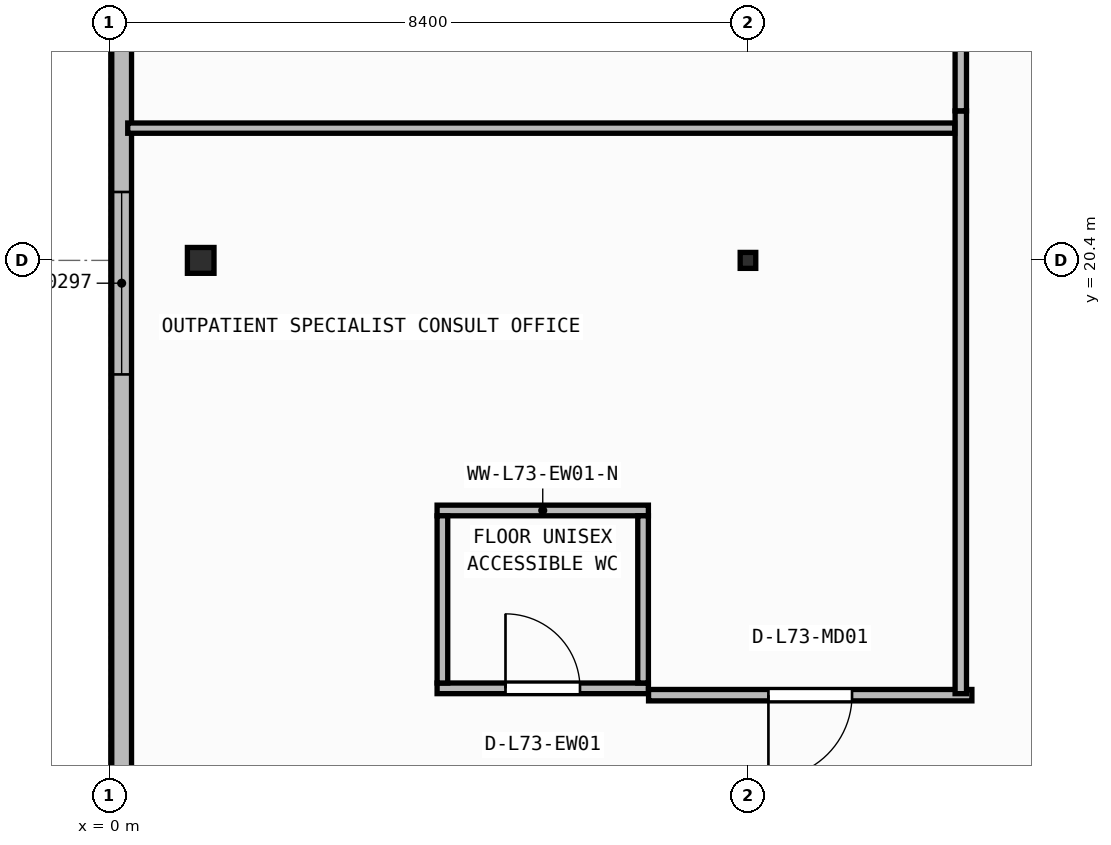
"""IFC4 building model, lengths in metres.
Left out: names, types, materials, properties, quantities, classifications, styles, units other than length and angle.
Written with IfcOpenShell. Run it as: python <this file> out.ifc"""

import sys

from ifc_helpers import new_model, si_unit, direction, frame, frame_2d, origin, origin_2d, place, context, subcontext, project, spatial, rectangle, i_section, extrude, element, fill, save


model = new_model("IFC4")
c1 = context("Model", 3, precision=1e-05, world=origin(), true_north=direction((0.0, 1.0)))
c2 = subcontext(c1, "Body", "Model", "MODEL_VIEW")
j1 = project(units=[si_unit("LENGTHUNIT", "METRE"), si_unit("PLANEANGLEUNIT", "RADIAN")], contexts=[c1])
p1 = place(None, origin())
s1 = spatial("IfcSite", under=j1, at=p1, CompositionType="ELEMENT")
p2 = place(p1, origin())
s2 = spatial("IfcBuilding", under=s1, at=p2, CompositionType="ELEMENT")
p3 = place(p2, frame((0.0, 0.0, 296.05)))
s3 = spatial("IfcBuildingStorey", under=s2, at=p3, CompositionType="ELEMENT", Elevation=296.05)
p4 = place(p3, frame((1.2, 20.4, 0.0), z_axis=(0.0, 0.0, 1.0), x_axis=(1.0, 0.0, 0.0)))
e1 = element("IfcColumn", 1, at=p4, inside=s3, PredefinedType="COLUMN", context=c2, shape_type="SweptSolid", body=[
    extrude(i_section(OverallWidth=0.35, OverallDepth=0.34, WebThickness=0.016, FlangeThickness=0.028, at=origin_2d()), origin(), (0.0, 0.0, 1.0), 3.95),
])
p5 = place(p3, frame((8.4, 20.4, 0.0), z_axis=(0.0, 0.0, 1.0), x_axis=(1.0, 0.0, 0.0)))
e2 = element("IfcColumn", 2, at=p5, inside=s3, PredefinedType="COLUMN", context=c2, shape_type="SweptSolid", body=[
    extrude(i_section(OverallWidth=0.205, OverallDepth=0.21, WebThickness=0.009, FlangeThickness=0.014, FilletRadius=0.011, at=origin_2d()), origin(), (0.0, 0.0, 1.0), 3.95),
])
p6 = place(p3, frame((0.16, 37.74, 0.0), z_axis=(0.0, 0.0, 1.0), x_axis=(0.0, -1.0, 0.0)))
e3 = element("IfcWall", 3, at=p6, inside=s3, PredefinedType="STANDARD", context=c2, shape_type="SweptSolid", body=[
    extrude(rectangle(XDim=35.28, YDim=0.26, at=frame_2d((17.64, 0.0))), origin(), (0.0, 0.0, 1.0), 3.71),
])
p7 = place(p6, frame((16.44, 0.0, 0.9)))
e4 = element("IfcOpeningElement", 4, at=p7, cuts=e3, PredefinedType="OPENING", context=c2, shape_type="SweptSolid", body=[
    extrude(rectangle(XDim=2.4, YDim=1.65, at=frame_2d((1.2, 0.825))), frame((0.0, 0.14, 0.0), z_axis=(0.0, -1.0, 0.0), x_axis=(1.0, 0.0, 0.0)), (0.0, 0.0, 1.0), 0.28),
])
p8 = place(p3, frame((4.31, 14.77, 0.0), z_axis=(0.0, 0.0, 1.0), x_axis=(1.0, 0.0, 0.0)))
e5 = element("IfcWall", 5, at=p8, inside=s3, PredefinedType="PARTITIONING", context=c2, shape_type="SweptSolid", body=[
    extrude(rectangle(XDim=2.78, YDim=0.14, at=frame_2d((1.39, 0.0))), origin(), (0.0, 0.0, 1.0), 3.71),
])
p9 = place(p8, frame((0.9, 0.0, 0.0)))
e6 = element("IfcOpeningElement", 6, at=p9, cuts=e5, PredefinedType="OPENING", context=c2, shape_type="SweptSolid", body=[
    extrude(rectangle(XDim=0.98, YDim=2.1, at=frame_2d((0.49, 1.05))), frame((0.0, 0.08, 0.0), z_axis=(0.0, -1.0, 0.0), x_axis=(1.0, 0.0, 0.0)), (0.0, 0.0, 1.0), 0.16),
])
p10 = place(p3, frame((4.31, 17.11, 0.0), z_axis=(0.0, 0.0, 1.0), x_axis=(1.0, 0.0, 0.0)))
e7 = element("IfcWall", 7, at=p10, inside=s3, PredefinedType="PARTITIONING", context=c2, shape_type="SweptSolid", body=[
    extrude(rectangle(XDim=2.78, YDim=0.14, at=frame_2d((1.39, 0.0))), origin(), (0.0, 0.0, 1.0), 3.71),
])
for number, where, z_axis, x_axis in (
    (8, (4.38, 14.84, 0.0), (0.0, 0.0, 1.0), (0.0, 1.0, 0.0)),
    (9, (7.02, 14.84, 0.0), (0.0, 0.0, 1.0), (0.0, 1.0, 0.0)),
):
    element("IfcWall", number, at=place(p3, frame(where, z_axis=z_axis, x_axis=x_axis)), inside=s3, PredefinedType="PARTITIONING", context=c2, shape_type="SweptSolid", body=[
        extrude(rectangle(XDim=2.2, YDim=0.14, at=frame_2d((1.1, 0.0))), origin(), (0.0, 0.0, 1.0), 3.71),
    ])
p11 = place(p3, frame((11.346, 14.68, 0.0), z_axis=(0.0, 0.0, 1.0), x_axis=(-1.0, 0.0, 0.0)))
e10 = element("IfcWall", 10, at=p11, inside=s3, PredefinedType="PARTITIONING", context=c2, shape_type="SweptSolid", body=[
    extrude(rectangle(XDim=4.254, YDim=0.15, at=frame_2d((2.127, 0.0))), origin(), (0.0, 0.0, 1.0), 3.71),
])
p12 = place(p11, frame((1.577, 0.0, 0.0)))
e11 = element("IfcOpeningElement", 11, at=p12, cuts=e10, PredefinedType="OPENING", context=c2, shape_type="SweptSolid", body=[
    extrude(rectangle(XDim=1.1, YDim=2.1, at=frame_2d((0.55, 1.05))), frame((0.0, 0.085, 0.0), z_axis=(0.0, -1.0, 0.0), x_axis=(1.0, 0.0, 0.0)), (0.0, 0.0, 1.0), 0.17),
])
p13 = place(p3, frame((11.2, 22.366, 0.0), z_axis=(0.0, 0.0, 1.0), x_axis=(0.0, -1.0, 0.0)))
e12 = element("IfcWall", 12, at=p13, inside=s3, PredefinedType="PARTITIONING", context=c2, shape_type="SweptSolid", body=[
    extrude(rectangle(XDim=7.666, YDim=0.15, at=frame_2d((3.833, 0.0))), origin(), (0.0, 0.0, 1.0), 3.71),
])
p14 = place(p3, frame((11.2, 29.6, 0.0), z_axis=(0.0, 0.0, 1.0), x_axis=(0.0, -1.0, 0.0)))
e13 = element("IfcWall", 13, at=p14, inside=s3, PredefinedType="PARTITIONING", context=c2, shape_type="SweptSolid", body=[
    extrude(rectangle(XDim=7.232, YDim=0.15, at=frame_2d((3.616, 0.0))), origin(), (0.0, 0.0, 1.0), 3.71),
])
p15 = place(p14, frame((3.066, 0.0, 0.0)))
e14 = element("IfcOpeningElement", 14, at=p15, cuts=e13, PredefinedType="OPENING", context=c2, shape_type="SweptSolid", body=[
    extrude(rectangle(XDim=1.1, YDim=2.1, at=frame_2d((0.55, 1.05))), frame((0.0, 0.085, 0.0), z_axis=(0.0, -1.0, 0.0), x_axis=(1.0, 0.0, 0.0)), (0.0, 0.0, 1.0), 0.17),
])
p16 = place(p3, frame((11.12, 22.14, 0.0), z_axis=(0.0, 0.0, 1.0), x_axis=(-1.0, 0.0, 0.0)))
e15 = element("IfcWall", 15, at=p16, inside=s3, PredefinedType="PARTITIONING", context=c2, shape_type="SweptSolid", body=[
    extrude(rectangle(XDim=10.88, YDim=0.135, at=frame_2d((5.44, 0.0))), origin(), (0.0, 0.0, 1.0), 3.71),
])
p17 = place(p7, origin())
e16 = element("IfcWindow", 16, at=p17, inside=s3, PartitioningType="SINGLE_PANEL", PredefinedType="WINDOW", context=c2, shape_type="SweptSolid", body=[
    extrude(rectangle(XDim=2.4, YDim=1.65, at=frame_2d((1.2, 0.825))), frame((0.0, 0.03, 0.0), z_axis=(0.0, -1.0, 0.0), x_axis=(1.0, 0.0, 0.0)), (0.0, 0.0, 1.0), 0.06),
])
fill(e4, e16)
p18 = place(p9, origin())
e17 = element("IfcDoor", 17, at=p18, inside=s3, OperationType="SINGLE_SWING_LEFT", PredefinedType="DOOR", context=c2, shape_type="SweptSolid", body=[
    extrude(rectangle(XDim=0.98, YDim=2.1, at=frame_2d((0.49, 1.05))), frame((0.0, 0.025, 0.0), z_axis=(0.0, -1.0, 0.0), x_axis=(1.0, 0.0, 0.0)), (0.0, 0.0, 1.0), 0.05),
])
fill(e6, e17)
p19 = place(p12, origin())
e18 = element("IfcDoor", 18, at=p19, inside=s3, OperationType="SINGLE_SWING_RIGHT", PredefinedType="DOOR", context=c2, shape_type="SweptSolid", body=[
    extrude(rectangle(XDim=1.1, YDim=2.1, at=frame_2d((0.55, 1.05))), frame((0.0, 0.025, 0.0), z_axis=(0.0, -1.0, 0.0), x_axis=(1.0, 0.0, 0.0)), (0.0, 0.0, 1.0), 0.05),
])
fill(e11, e18)
save(model, sys.argv[1])
